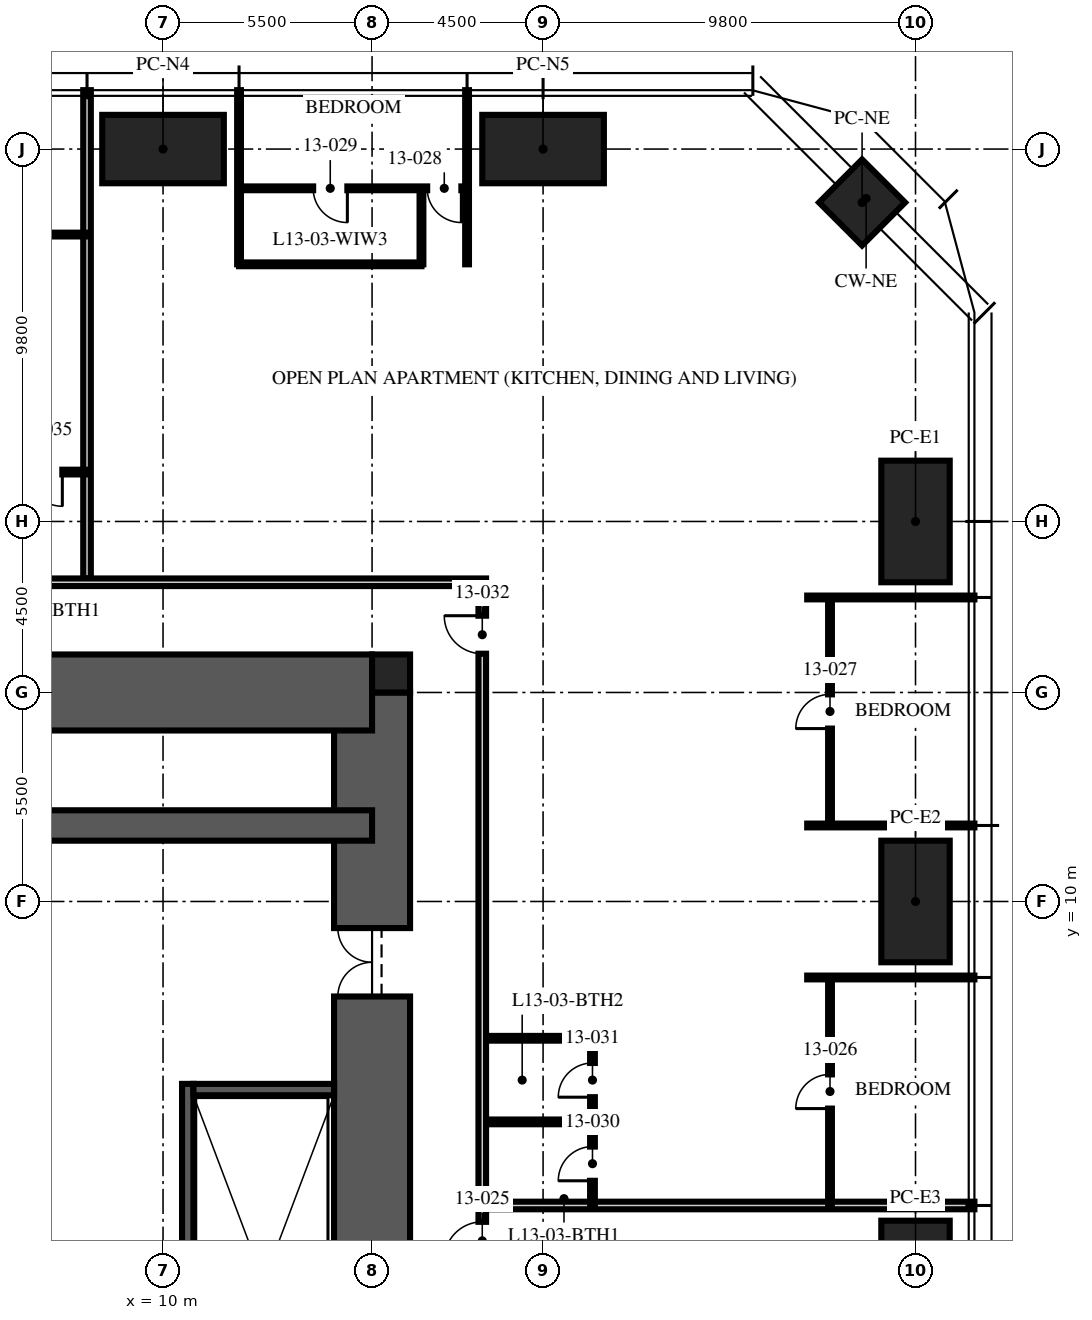
"""IFC4 building model, lengths in metres.
Left out: names, types, materials, properties, quantities, classifications, styles, units other than length and angle.
Written with IfcOpenShell. Run it as: python <this file> out.ifc"""

import sys

from ifc_helpers import new_model, si_unit, direction, frame, frame_2d, origin, origin_2d, place, context, subcontext, project, spatial, rectangle, hollow_rectangle, extrude, element, fill, save


model = new_model("IFC4")
c1 = context("Model", 3, precision=1e-05, world=origin(), true_north=direction((0.0, 1.0)))
c2 = subcontext(c1, "Body", "Model", "MODEL_VIEW")
j1 = project(units=[si_unit("LENGTHUNIT", "METRE"), si_unit("PLANEANGLEUNIT", "RADIAN")], contexts=[c1])
p1 = place(None, origin())
s1 = spatial("IfcSite", under=j1, at=p1, CompositionType="ELEMENT")
p2 = place(p1, origin())
s2 = spatial("IfcBuilding", under=s1, at=p2, CompositionType="ELEMENT")
p3 = place(p2, frame((0.0, 0.0, 54.75)))
s3 = spatial("IfcBuildingStorey", under=s2, at=p3, CompositionType="ELEMENT", Elevation=54.75)
p4 = place(p3, frame((15.5, -15.5, -0.25), z_axis=(0.0, 0.0, 1.0), x_axis=(0.0, 1.0, 0.0)))
e1 = element("IfcWall", 1, at=p4, inside=s3, PredefinedType="SHEAR", context=c2, shape_type="SweptSolid", body=[
    extrude(rectangle(XDim=31.0, YDim=2.0, at=frame_2d((15.5, 0.0))), origin(), (0.0, 0.0, 1.0), 3.75),
])
p5 = place(p4, frame((6.5, 0.0, 0.25)))
e2 = element("IfcOpeningElement", 2, at=p5, cuts=e1, PredefinedType="OPENING", context=c2, shape_type="SweptSolid", body=[
    extrude(rectangle(XDim=1.2, YDim=2.1, at=frame_2d((0.6, 1.05))), frame((0.0, 1.01, 0.0), z_axis=(0.0, -1.0, 0.0), x_axis=(1.0, 0.0, 0.0)), (0.0, 0.0, 1.0), 2.02),
])
p6 = place(p4, frame((23.0, 0.0, 0.25)))
e3 = element("IfcOpeningElement", 3, at=p6, cuts=e1, PredefinedType="OPENING", context=c2, shape_type="SweptSolid", body=[
    extrude(rectangle(XDim=1.8, YDim=2.1, at=frame_2d((0.9, 1.05))), frame((0.0, 1.01, 0.0), z_axis=(0.0, -1.0, 0.0), x_axis=(1.0, 0.0, 0.0)), (0.0, 0.0, 1.0), 2.02),
])
p7 = place(p3, frame((-15.5, 15.5, -0.25), z_axis=(0.0, 0.0, 1.0), x_axis=(1.0, 0.0, 0.0)))
e4 = element("IfcWall", 4, at=p7, inside=s3, PredefinedType="SHEAR", context=c2, shape_type="SweptSolid", body=[
    extrude(rectangle(XDim=31.0, YDim=2.0, at=frame_2d((15.5, 0.0))), origin(), (0.0, 0.0, 1.0), 3.75),
])
p8 = place(p7, frame((10.4, 0.0, 0.25)))
e5 = element("IfcOpeningElement", 5, at=p8, cuts=e4, PredefinedType="OPENING", context=c2, shape_type="SweptSolid", body=[
    extrude(rectangle(XDim=1.1, YDim=2.1, at=frame_2d((0.55, 1.05))), frame((0.0, 1.01, 0.0), z_axis=(0.0, -1.0, 0.0), x_axis=(1.0, 0.0, 0.0)), (0.0, 0.0, 1.0), 2.02),
])
p9 = place(p7, frame((13.5, 0.0, 0.25)))
e6 = element("IfcOpeningElement", 6, at=p9, cuts=e4, PredefinedType="OPENING", context=c2, shape_type="SweptSolid", body=[
    extrude(rectangle(XDim=1.1, YDim=2.1, at=frame_2d((0.55, 1.05))), frame((0.0, 1.01, 0.0), z_axis=(0.0, -1.0, 0.0), x_axis=(1.0, 0.0, 0.0)), (0.0, 0.0, 1.0), 2.02),
])
p10 = place(p7, frame((16.6, 0.0, 0.25)))
e7 = element("IfcOpeningElement", 7, at=p10, cuts=e4, PredefinedType="OPENING", context=c2, shape_type="SweptSolid", body=[
    extrude(rectangle(XDim=1.1, YDim=2.1, at=frame_2d((0.55, 1.05))), frame((0.0, 1.01, 0.0), z_axis=(0.0, -1.0, 0.0), x_axis=(1.0, 0.0, 0.0)), (0.0, 0.0, 1.0), 2.02),
])
p11 = place(p3, frame((-15.5, 12.0, -0.25), z_axis=(0.0, 0.0, 1.0), x_axis=(1.0, 0.0, 0.0)))
e8 = element("IfcWall", 8, at=p11, inside=s3, PredefinedType="SHEAR", context=c2, shape_type="SweptSolid", body=[
    extrude(rectangle(XDim=31.0, YDim=0.8, at=frame_2d((15.5, 0.0))), origin(), (0.0, 0.0, 1.0), 3.75),
])
p12 = place(p3, frame((16.0, 16.0, -0.25), z_axis=(0.0, 0.0, 1.0), x_axis=(1.0, 0.0, 0.0)))
e9 = element("IfcColumn", 9, at=p12, inside=s3, PredefinedType="COLUMN", context=c2, shape_type="SweptSolid", body=[
    extrude(rectangle(XDim=1.0, YDim=1.0, at=origin_2d()), origin(), (0.0, 0.0, 1.0), 3.75),
])
for number, where, z_axis, x_axis in (
    (10, (10.0, 29.8, 0.0), (0.0, 0.0, 1.0), (1.0, 0.0, 0.0)),
    (11, (20.0, 29.8, 0.0), (0.0, 0.0, 1.0), (1.0, 0.0, 0.0)),
    (12, (29.8, 20.0, 0.0), (0.0, 0.0, 1.0), (0.0, 1.0, 0.0)),
    (13, (29.8, 10.0, 0.0), (0.0, 0.0, 1.0), (0.0, 1.0, 0.0)),
    (14, (29.8, 0.0, 0.0), (0.0, 0.0, 1.0), (0.0, 1.0, 0.0)),
):
    element("IfcColumn", number, at=place(p3, frame(where, z_axis=z_axis, x_axis=x_axis)), inside=s3, PredefinedType="COLUMN", context=c2, shape_type="SweptSolid", body=[
        extrude(hollow_rectangle(XDim=3.2, YDim=1.8, WallThickness=0.2, at=origin_2d()), origin(), (0.0, 0.0, 1.0), 3.75),
    ])
p13 = place(p3, frame((28.394, 28.394, 0.0), z_axis=(0.0, 0.0, 1.0), x_axis=(0.707106781187, -0.707106781187, 0.0)))
e15 = element("IfcColumn", 15, at=p13, inside=s3, PredefinedType="COLUMN", context=c2, shape_type="SweptSolid", body=[
    extrude(hollow_rectangle(XDim=1.6, YDim=1.6, WallThickness=0.1, at=origin_2d()), origin(), (0.0, 0.0, 1.0), 3.75),
])
p14 = place(p3, frame((10.65, -4.9, 0.0), z_axis=(0.0, 0.0, 1.0), x_axis=(0.0, 1.0, 0.0)))
e16 = element("IfcWall", 16, at=p14, inside=s3, PredefinedType="SOLIDWALL", context=c2, shape_type="SweptSolid", body=[
    extrude(rectangle(XDim=10.1, YDim=0.3, at=frame_2d((5.05, 0.0))), origin(), (0.0, 0.0, 1.0), 3.5),
])
p15 = place(p3, frame((14.5, 5.05, 0.0), z_axis=(0.0, 0.0, 1.0), x_axis=(-1.0, 0.0, 0.0)))
e17 = element("IfcWall", 17, at=p15, inside=s3, PredefinedType="SOLIDWALL", context=c2, shape_type="SweptSolid", body=[
    extrude(rectangle(XDim=3.7, YDim=0.3, at=frame_2d((1.85, 0.0))), origin(), (0.0, 0.0, 1.0), 3.5),
])
p16 = place(p3, frame((18.5, 2.0, 0.0), z_axis=(0.0, 0.0, 1.0), x_axis=(1.0, 0.0, 0.0)))
e18 = element("IfcWall", 18, at=p16, inside=s3, PredefinedType="PARTITIONING", context=c2, shape_type="SweptSolid", body=[
    extrude(rectangle(XDim=12.85, YDim=0.2, at=frame_2d((6.425, 0.0))), origin(), (0.0, 0.0, 1.0), 2.71),
])
for number, where, z_axis, x_axis in (
    (19, (26.95, 8.0, 0.0), (0.0, 0.0, 1.0), (1.0, 0.0, 0.0)),
    (20, (26.95, 12.0, 0.0), (0.0, 0.0, 1.0), (1.0, 0.0, 0.0)),
    (21, (26.95, 18.0, 0.0), (0.0, 0.0, 1.0), (1.0, 0.0, 0.0)),
):
    element("IfcWall", number, at=place(p3, frame(where, z_axis=z_axis, x_axis=x_axis)), inside=s3, PredefinedType="PARTITIONING", context=c2, shape_type="SweptSolid", body=[
        extrude(rectangle(XDim=4.4, YDim=0.1, at=frame_2d((2.2, 0.0))), origin(), (0.0, 0.0, 1.0), 2.71),
    ])
for number, where, z_axis, x_axis in (
    (22, (18.0, 26.767, 0.0), (0.0, 0.0, 1.0), (0.0, 1.0, 0.0)),
    (23, (12.0, 26.767, 0.0), (0.0, 0.0, 1.0), (0.0, 1.0, 0.0)),
):
    element("IfcWall", number, at=place(p3, frame(where, z_axis=z_axis, x_axis=x_axis)), inside=s3, PredefinedType="PARTITIONING", context=c2, shape_type="SweptSolid", body=[
        extrude(rectangle(XDim=4.583, YDim=0.1, at=frame_2d((2.292, 0.0))), origin(), (0.0, 0.0, 1.0), 2.71),
    ])
p17 = place(p3, frame((8.0, 18.5, 0.0), z_axis=(0.0, 0.0, 1.0), x_axis=(0.0, 1.0, 0.0)))
e24 = element("IfcWall", 24, at=p17, inside=s3, PredefinedType="PARTITIONING", context=c2, shape_type="SweptSolid", body=[
    extrude(rectangle(XDim=12.85, YDim=0.2, at=frame_2d((6.425, 0.0))), origin(), (0.0, 0.0, 1.0), 2.71),
])
p18 = place(p3, frame((27.55, 2.0, 0.0), z_axis=(0.0, 0.0, 1.0), x_axis=(0.0, 1.0, 0.0)))
e25 = element("IfcWall", 25, at=p18, inside=s3, PredefinedType="PARTITIONING", context=c2, shape_type="SweptSolid", body=[
    extrude(rectangle(XDim=6.0, YDim=0.1, at=frame_2d((3.0, 0.0))), origin(), (0.0, 0.0, 1.0), 2.61),
])
p19 = place(p18, frame((2.55, 0.0, 0.0)))
e26 = element("IfcOpeningElement", 26, at=p19, cuts=e25, PredefinedType="OPENING", context=c2, shape_type="SweptSolid", body=[
    extrude(rectangle(XDim=0.9, YDim=2.1, at=frame_2d((0.45, 1.05))), frame((0.0, 0.06, 0.0), z_axis=(0.0, -1.0, 0.0), x_axis=(1.0, 0.0, 0.0)), (0.0, 0.0, 1.0), 0.12),
])
p20 = place(p3, frame((27.55, 12.0, 0.0), z_axis=(0.0, 0.0, 1.0), x_axis=(0.0, 1.0, 0.0)))
e27 = element("IfcWall", 27, at=p20, inside=s3, PredefinedType="PARTITIONING", context=c2, shape_type="SweptSolid", body=[
    extrude(rectangle(XDim=6.0, YDim=0.1, at=frame_2d((3.0, 0.0))), origin(), (0.0, 0.0, 1.0), 2.61),
])
p21 = place(p20, frame((2.55, 0.0, 0.0)))
e28 = element("IfcOpeningElement", 28, at=p21, cuts=e27, PredefinedType="OPENING", context=c2, shape_type="SweptSolid", body=[
    extrude(rectangle(XDim=0.9, YDim=2.1, at=frame_2d((0.45, 1.05))), frame((0.0, 0.06, 0.0), z_axis=(0.0, -1.0, 0.0), x_axis=(1.0, 0.0, 0.0)), (0.0, 0.0, 1.0), 0.12),
])
p22 = place(p3, frame((18.0, 28.767, 0.0), z_axis=(0.0, 0.0, 1.0), x_axis=(-1.0, 0.0, 0.0)))
e29 = element("IfcWall", 29, at=p22, inside=s3, PredefinedType="PARTITIONING", context=c2, shape_type="SweptSolid", body=[
    extrude(rectangle(XDim=6.0, YDim=0.1, at=frame_2d((3.0, 0.0))), origin(), (0.0, 0.0, 1.0), 2.61),
])
p23 = place(p22, frame((0.15, 0.0, 0.0)))
e30 = element("IfcOpeningElement", 30, at=p23, cuts=e29, PredefinedType="OPENING", context=c2, shape_type="SweptSolid", body=[
    extrude(rectangle(XDim=0.9, YDim=2.1, at=frame_2d((0.45, 1.05))), frame((0.0, 0.06, 0.0), z_axis=(0.0, -1.0, 0.0), x_axis=(1.0, 0.0, 0.0)), (0.0, 0.0, 1.0), 0.12),
])
p24 = place(p22, frame((3.15, 0.0, 0.0)))
e31 = element("IfcOpeningElement", 31, at=p24, cuts=e29, PredefinedType="OPENING", context=c2, shape_type="SweptSolid", body=[
    extrude(rectangle(XDim=0.9, YDim=2.1, at=frame_2d((0.45, 1.05))), frame((0.0, 0.06, 0.0), z_axis=(0.0, -1.0, 0.0), x_axis=(1.0, 0.0, 0.0)), (0.0, 0.0, 1.0), 0.12),
])
p25 = place(p3, frame((16.8, 26.767, 0.0), z_axis=(0.0, 0.0, 1.0), x_axis=(0.0, 1.0, 0.0)))
e32 = element("IfcWall", 32, at=p25, inside=s3, PredefinedType="PARTITIONING", context=c2, shape_type="SweptSolid", body=[
    extrude(rectangle(XDim=2.0, YDim=0.1, at=frame_2d((1.0, 0.0))), origin(), (0.0, 0.0, 1.0), 3.5),
])
p26 = place(p3, frame((16.8, 26.767, 0.0), z_axis=(0.0, 0.0, 1.0), x_axis=(-1.0, 0.0, 0.0)))
e33 = element("IfcWall", 33, at=p26, inside=s3, PredefinedType="PARTITIONING", context=c2, shape_type="SweptSolid", body=[
    extrude(rectangle(XDim=4.8, YDim=0.1, at=frame_2d((2.4, 0.0))), origin(), (0.0, 0.0, 1.0), 2.61),
])
p27 = place(p3, frame((21.3, 2.0, 0.0), z_axis=(0.0, 0.0, 1.0), x_axis=(0.0, 1.0, 0.0)))
e34 = element("IfcWall", 34, at=p27, inside=s3, PredefinedType="PARTITIONING", context=c2, shape_type="SweptSolid", body=[
    extrude(rectangle(XDim=4.4, YDim=0.125, at=frame_2d((2.2, 0.0))), origin(), (0.0, 0.0, 1.0), 2.61),
])
p28 = place(p27, frame((0.65, 0.0, 0.0)))
e35 = element("IfcOpeningElement", 35, at=p28, cuts=e34, PredefinedType="OPENING", context=c2, shape_type="SweptSolid", body=[
    extrude(rectangle(XDim=0.9, YDim=2.1, at=frame_2d((0.45, 1.05))), frame((0.0, 0.073, 0.0), z_axis=(0.0, -1.0, 0.0), x_axis=(1.0, 0.0, 0.0)), (0.0, 0.0, 1.0), 0.145),
])
p29 = place(p27, frame((2.85, 0.0, 0.0)))
e36 = element("IfcOpeningElement", 36, at=p29, cuts=e34, PredefinedType="OPENING", context=c2, shape_type="SweptSolid", body=[
    extrude(rectangle(XDim=0.9, YDim=2.1, at=frame_2d((0.45, 1.05))), frame((0.0, 0.073, 0.0), z_axis=(0.0, -1.0, 0.0), x_axis=(1.0, 0.0, 0.0)), (0.0, 0.0, 1.0), 0.145),
])
for number, where, z_axis, x_axis in (
    (37, (18.5, 4.2, 0.0), (0.0, 0.0, 1.0), (1.0, 0.0, 0.0)),
    (38, (18.5, 6.4, 0.0), (0.0, 0.0, 1.0), (1.0, 0.0, 0.0)),
):
    element("IfcWall", number, at=place(p3, frame(where, z_axis=z_axis, x_axis=x_axis)), inside=s3, PredefinedType="PARTITIONING", context=c2, shape_type="SweptSolid", body=[
        extrude(rectangle(XDim=2.8, YDim=0.125, at=frame_2d((1.4, 0.0))), origin(), (0.0, 0.0, 1.0), 3.5),
    ])
p30 = place(p3, frame((8.0, 27.55, 0.0), z_axis=(0.0, 0.0, 1.0), x_axis=(-1.0, 0.0, 0.0)))
e39 = element("IfcWall", 39, at=p30, inside=s3, PredefinedType="PARTITIONING", context=c2, shape_type="SweptSolid", body=[
    extrude(rectangle(XDim=6.0, YDim=0.1, at=frame_2d((3.0, 0.0))), origin(), (0.0, 0.0, 1.0), 2.61),
])
p31 = place(p30, frame((2.55, 0.0, 0.0)))
e40 = element("IfcOpeningElement", 40, at=p31, cuts=e39, PredefinedType="OPENING", context=c2, shape_type="SweptSolid", body=[
    extrude(rectangle(XDim=0.9, YDim=2.1, at=frame_2d((0.45, 1.05))), frame((0.0, 0.06, 0.0), z_axis=(0.0, -1.0, 0.0), x_axis=(1.0, 0.0, 0.0)), (0.0, 0.0, 1.0), 0.12),
])
p32 = place(p3, frame((8.0, 21.3, 0.0), z_axis=(0.0, 0.0, 1.0), x_axis=(-1.0, 0.0, 0.0)))
e41 = element("IfcWall", 41, at=p32, inside=s3, PredefinedType="PARTITIONING", context=c2, shape_type="SweptSolid", body=[
    extrude(rectangle(XDim=2.2, YDim=0.125, at=frame_2d((1.1, 0.0))), origin(), (0.0, 0.0, 1.0), 3.5),
])
p33 = place(p32, frame((0.65, 0.0, 0.0)))
e42 = element("IfcOpeningElement", 42, at=p33, cuts=e41, PredefinedType="OPENING", context=c2, shape_type="SweptSolid", body=[
    extrude(rectangle(XDim=0.9, YDim=2.1, at=frame_2d((0.45, 1.05))), frame((0.0, 0.073, 0.0), z_axis=(0.0, -1.0, 0.0), x_axis=(1.0, 0.0, 0.0)), (0.0, 0.0, 1.0), 0.145),
])
p34 = place(p3, frame((18.4, -18.3, 0.0), z_axis=(0.0, 0.0, 1.0), x_axis=(0.0, 1.0, 0.0)))
e43 = element("IfcWall", 43, at=p34, inside=s3, PredefinedType="PARTITIONING", context=c2, shape_type="SweptSolid", body=[
    extrude(rectangle(XDim=36.6, YDim=0.2, at=frame_2d((18.3, 0.0))), origin(), (0.0, 0.0, 1.0), 2.3),
])
p35 = place(p34, frame((14.87, 0.0, 0.0)))
e44 = element("IfcOpeningElement", 44, at=p35, cuts=e43, PredefinedType="OPENING", context=c2, shape_type="SweptSolid", body=[
    extrude(rectangle(XDim=1.0, YDim=2.2, at=frame_2d((0.5, 1.1))), frame((0.0, 0.11, 0.0), z_axis=(0.0, -1.0, 0.0), x_axis=(1.0, 0.0, 0.0)), (0.0, 0.0, 1.0), 0.22),
])
p36 = place(p34, frame((18.87, 0.0, 0.0)))
e45 = element("IfcOpeningElement", 45, at=p36, cuts=e43, PredefinedType="OPENING", context=c2, shape_type="SweptSolid", body=[
    extrude(rectangle(XDim=1.0, YDim=2.2, at=frame_2d((0.5, 1.1))), frame((0.0, 0.11, 0.0), z_axis=(0.0, -1.0, 0.0), x_axis=(1.0, 0.0, 0.0)), (0.0, 0.0, 1.0), 0.22),
])
p37 = place(p34, frame((34.82, 0.0, 0.0)))
e46 = element("IfcOpeningElement", 46, at=p37, cuts=e43, PredefinedType="OPENING", context=c2, shape_type="SweptSolid", body=[
    extrude(rectangle(XDim=1.0, YDim=2.2, at=frame_2d((0.5, 1.1))), frame((0.0, 0.11, 0.0), z_axis=(0.0, -1.0, 0.0), x_axis=(1.0, 0.0, 0.0)), (0.0, 0.0, 1.0), 0.22),
])
p38 = place(p3, frame((-18.5, 18.4, 0.0), z_axis=(0.0, 0.0, 1.0), x_axis=(1.0, 0.0, 0.0)))
e47 = element("IfcWall", 47, at=p38, inside=s3, PredefinedType="PARTITIONING", context=c2, shape_type="SweptSolid", body=[
    extrude(rectangle(XDim=37.0, YDim=0.2, at=frame_2d((18.5, 0.0))), origin(), (0.0, 0.0, 1.0), 2.3),
])
p39 = place(p38, frame((1.23, 0.0, 0.0)))
e48 = element("IfcOpeningElement", 48, at=p39, cuts=e47, PredefinedType="OPENING", context=c2, shape_type="SweptSolid", body=[
    extrude(rectangle(XDim=1.0, YDim=2.2, at=frame_2d((0.5, 1.1))), frame((0.0, 0.11, 0.0), z_axis=(0.0, -1.0, 0.0), x_axis=(1.0, 0.0, 0.0)), (0.0, 0.0, 1.0), 0.22),
])
p40 = place(p6, origin())
e49 = element("IfcDoor", 49, at=p40, inside=s3, OperationType="DOUBLE_DOOR_SINGLE_SWING", PredefinedType="DOOR", context=c2, shape_type="SweptSolid", body=[
    extrude(rectangle(XDim=1.8, YDim=2.1, at=frame_2d((0.9, 1.05))), frame((0.0, 0.025, 0.0), z_axis=(0.0, -1.0, 0.0), x_axis=(1.0, 0.0, 0.0)), (0.0, 0.0, 1.0), 0.05),
])
fill(e3, e49)
p41 = place(p36, origin())
e50 = element("IfcDoor", 50, at=p41, inside=s3, OperationType="SINGLE_SWING_LEFT", PredefinedType="DOOR", context=c2, shape_type="SweptSolid", body=[
    extrude(rectangle(XDim=1.0, YDim=2.2, at=frame_2d((0.5, 1.1))), frame((0.0, 0.025, 0.0), z_axis=(0.0, -1.0, 0.0), x_axis=(1.0, 0.0, 0.0)), (0.0, 0.0, 1.0), 0.05),
])
fill(e45, e50)
p42 = place(p19, origin())
e51 = element("IfcDoor", 51, at=p42, inside=s3, OperationType="SINGLE_SWING_LEFT", PredefinedType="DOOR", context=c2, shape_type="SweptSolid", body=[
    extrude(rectangle(XDim=0.9, YDim=2.1, at=frame_2d((0.45, 1.05))), frame((0.0, 0.025, 0.0), z_axis=(0.0, -1.0, 0.0), x_axis=(1.0, 0.0, 0.0)), (0.0, 0.0, 1.0), 0.05),
])
fill(e26, e51)
p43 = place(p21, origin())
e52 = element("IfcDoor", 52, at=p43, inside=s3, OperationType="SINGLE_SWING_LEFT", PredefinedType="DOOR", context=c2, shape_type="SweptSolid", body=[
    extrude(rectangle(XDim=0.9, YDim=2.1, at=frame_2d((0.45, 1.05))), frame((0.0, 0.025, 0.0), z_axis=(0.0, -1.0, 0.0), x_axis=(1.0, 0.0, 0.0)), (0.0, 0.0, 1.0), 0.05),
])
fill(e28, e52)
p44 = place(p23, origin())
e53 = element("IfcDoor", 53, at=p44, inside=s3, OperationType="SINGLE_SWING_LEFT", PredefinedType="DOOR", context=c2, shape_type="SweptSolid", body=[
    extrude(rectangle(XDim=0.9, YDim=2.1, at=frame_2d((0.45, 1.05))), frame((0.0, 0.025, 0.0), z_axis=(0.0, -1.0, 0.0), x_axis=(1.0, 0.0, 0.0)), (0.0, 0.0, 1.0), 0.05),
])
fill(e30, e53)
p45 = place(p24, origin())
e54 = element("IfcDoor", 54, at=p45, inside=s3, OperationType="SINGLE_SWING_LEFT", PredefinedType="DOOR", context=c2, shape_type="SweptSolid", body=[
    extrude(rectangle(XDim=0.9, YDim=2.1, at=frame_2d((0.45, 1.05))), frame((0.0, 0.025, 0.0), z_axis=(0.0, -1.0, 0.0), x_axis=(1.0, 0.0, 0.0)), (0.0, 0.0, 1.0), 0.05),
])
fill(e31, e54)
p46 = place(p28, origin())
e55 = element("IfcDoor", 55, at=p46, inside=s3, OperationType="SINGLE_SWING_LEFT", PredefinedType="DOOR", context=c2, shape_type="SweptSolid", body=[
    extrude(rectangle(XDim=0.9, YDim=2.1, at=frame_2d((0.45, 1.05))), frame((0.0, 0.025, 0.0), z_axis=(0.0, -1.0, 0.0), x_axis=(1.0, 0.0, 0.0)), (0.0, 0.0, 1.0), 0.05),
])
fill(e35, e55)
p47 = place(p29, origin())
e56 = element("IfcDoor", 56, at=p47, inside=s3, OperationType="SINGLE_SWING_LEFT", PredefinedType="DOOR", context=c2, shape_type="SweptSolid", body=[
    extrude(rectangle(XDim=0.9, YDim=2.1, at=frame_2d((0.45, 1.05))), frame((0.0, 0.025, 0.0), z_axis=(0.0, -1.0, 0.0), x_axis=(1.0, 0.0, 0.0)), (0.0, 0.0, 1.0), 0.05),
])
fill(e36, e56)
p48 = place(p37, origin())
e57 = element("IfcDoor", 57, at=p48, inside=s3, OperationType="SINGLE_SWING_RIGHT", PredefinedType="DOOR", context=c2, shape_type="SweptSolid", body=[
    extrude(rectangle(XDim=1.0, YDim=2.2, at=frame_2d((0.5, 1.1))), frame((0.0, 0.025, 0.0), z_axis=(0.0, -1.0, 0.0), x_axis=(1.0, 0.0, 0.0)), (0.0, 0.0, 1.0), 0.05),
])
fill(e46, e57)
p49 = place(p33, origin())
e58 = element("IfcDoor", 58, at=p49, inside=s3, OperationType="SINGLE_SWING_LEFT", PredefinedType="DOOR", context=c2, shape_type="SweptSolid", body=[
    extrude(rectangle(XDim=0.9, YDim=2.1, at=frame_2d((0.45, 1.05))), frame((0.0, 0.025, 0.0), z_axis=(0.0, -1.0, 0.0), x_axis=(1.0, 0.0, 0.0)), (0.0, 0.0, 1.0), 0.05),
])
fill(e42, e58)
save(model, sys.argv[1])
